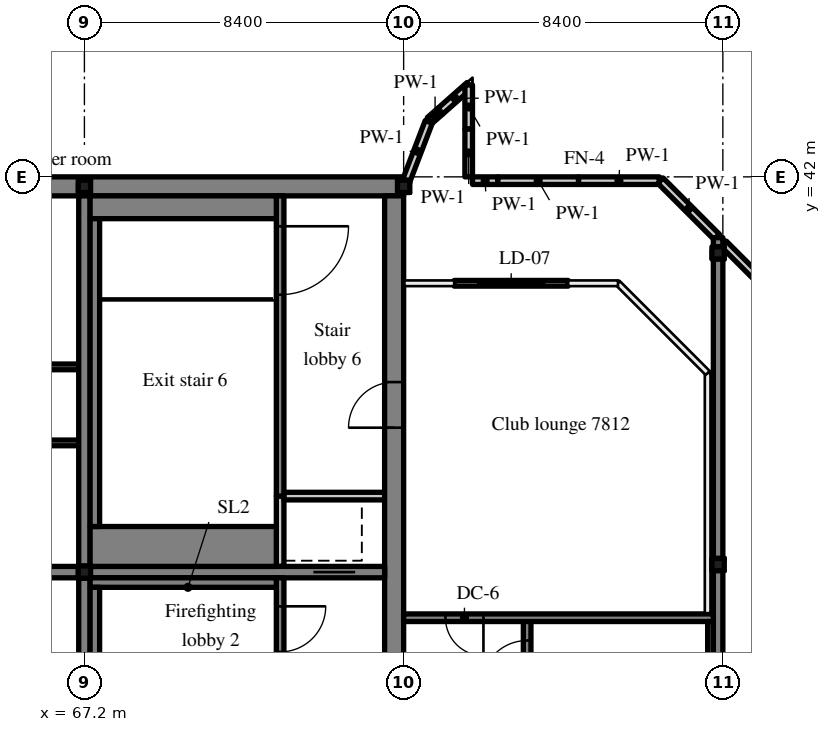
"""IFC4 building model, lengths in metres.
Left out: names, types, materials, properties, quantities, classifications, styles, units other than length and angle.
Written with IfcOpenShell. Run it as: python <this file> out.ifc"""

import sys

from ifc_helpers import new_model, si_unit, direction, frame, frame_2d, origin, origin_2d, place, context, subcontext, project, spatial, rectangle, hollow_circle, extrude, source, transform, mapped, element, fill, save


model = new_model("IFC4")
c1 = context("Model", 3, precision=1e-05, world=origin(), true_north=direction((0.0, 1.0)))
c2 = subcontext(c1, "Body", "Model", "MODEL_VIEW")
j1 = project(units=[si_unit("LENGTHUNIT", "METRE"), si_unit("PLANEANGLEUNIT", "RADIAN")], contexts=[c1])
p1 = place(None, origin())
s1 = spatial("IfcSite", under=j1, at=p1, CompositionType="ELEMENT")
p2 = place(p1, origin())
s2 = spatial("IfcBuilding", under=s1, at=p2, CompositionType="ELEMENT")
p3 = place(p2, frame((0.0, 0.0, 329.7)))
s3 = spatial("IfcBuildingStorey", under=s2, at=p3, CompositionType="ELEMENT", Elevation=329.7)
m1 = source(origin(), c2, "Body", "SweptSolid", [
    extrude(rectangle(XDim=50.4, YDim=0.5, at=frame_2d((25.2, 0.0))), origin(), (0.0, 0.0, 1.0), 4.72),
])
p4 = place(p3, frame((25.2, 41.75, 0.0), z_axis=(0.0, 0.0, 1.0), x_axis=(1.0, 0.0, 0.0)))
e1 = element("IfcWall", 1, at=p4, inside=s3, PredefinedType="SHEAR", context=c2, shape_type="MappedRepresentation", body=[
    mapped(m1, transform((0.0, 0.0, 0.0), scale=1.0)),
])
m2 = source(origin(), c2, "Body", "SweptSolid", [
    extrude(rectangle(XDim=19.0, YDim=0.5, at=frame_2d((9.5, 0.0))), origin(), (0.0, 0.0, 1.0), 4.72),
])
p5 = place(p3, frame((75.35, 22.5, 0.0), z_axis=(0.0, 0.0, 1.0), x_axis=(0.0, 1.0, 0.0)))
e2 = element("IfcWall", 2, at=p5, inside=s3, PredefinedType="SHEAR", context=c2, shape_type="MappedRepresentation", body=[
    mapped(m2, transform((0.0, 0.0, 0.0), scale=1.0)),
])
m3 = source(origin(), c2, "Body", "SweptSolid", [
    extrude(rectangle(XDim=1.2, YDim=2.1, at=frame_2d((0.6, 1.05))), frame((0.0, 0.26, 0.0), z_axis=(0.0, -1.0, 0.0), x_axis=(1.0, 0.0, 0.0)), (0.0, 0.0, 1.0), 0.52),
])
p6 = place(p5, frame((12.9, 0.0, 0.0)))
e3 = element("IfcOpeningElement", 3, at=p6, cuts=e2, PredefinedType="OPENING", context=c2, shape_type="MappedRepresentation", body=[
    mapped(m3, transform((0.0, 0.0, 0.0), scale=1.0)),
])
m4 = source(origin(), c2, "Body", "SweptSolid", [
    extrude(rectangle(XDim=19.0, YDim=0.3, at=frame_2d((9.5, 0.0))), origin(), (0.0, 0.0, 1.0), 4.72),
])
p7 = place(p3, frame((67.2, 22.5, 0.0), z_axis=(0.0, 0.0, 1.0), x_axis=(0.0, 1.0, 0.0)))
e4 = element("IfcWall", 4, at=p7, inside=s3, PredefinedType="SHEAR", context=c2, shape_type="MappedRepresentation", body=[
    mapped(m4, transform((0.0, 0.0, 0.0), scale=1.0)),
])
m5 = source(origin(), c2, "Body", "SweptSolid", [
    extrude(rectangle(XDim=16.5, YDim=0.3, at=frame_2d((8.25, 0.0))), origin(), (0.0, 0.0, 1.0), 4.72),
])
p8 = place(p3, frame((50.55, 31.6, 0.0), z_axis=(0.0, 0.0, 1.0), x_axis=(1.0, 0.0, 0.0)))
e5 = element("IfcWall", 5, at=p8, inside=s3, PredefinedType="SHEAR", context=c2, shape_type="MappedRepresentation", body=[
    mapped(m5, transform((0.0, 0.0, 0.0), scale=1.0)),
])
m6 = source(origin(), c2, "Body", "SweptSolid", [
    extrude(rectangle(XDim=1.0, YDim=2.1, at=frame_2d((0.5, 1.05))), frame((0.0, 0.16, 0.0), z_axis=(0.0, -1.0, 0.0), x_axis=(1.0, 0.0, 0.0)), (0.0, 0.0, 1.0), 0.32),
])
p9 = place(p8, frame((0.625, 0.0, 0.0)))
e6 = element("IfcOpeningElement", 6, at=p9, cuts=e5, PredefinedType="OPENING", context=c2, shape_type="MappedRepresentation", body=[
    mapped(m6, transform((0.0, 0.0, 0.0), scale=1.0)),
])
m7 = source(origin(), c2, "Body", "SweptSolid", [
    extrude(rectangle(XDim=7.75, YDim=0.3, at=frame_2d((3.875, 0.0))), origin(), (0.0, 0.0, 1.0), 4.72),
])
p10 = place(p3, frame((67.35, 31.6, 0.0), z_axis=(0.0, 0.0, 1.0), x_axis=(1.0, 0.0, 0.0)))
e7 = element("IfcWall", 7, at=p10, inside=s3, PredefinedType="SHEAR", context=c2, shape_type="MappedRepresentation", body=[
    mapped(m7, transform((0.0, 0.0, 0.0), scale=1.0)),
])
m8 = source(origin(), c2, "Body", "SweptSolid", [
    extrude(rectangle(XDim=1.1, YDim=2.1, at=frame_2d((0.55, 1.05))), frame((0.0, 0.16, 0.0), z_axis=(0.0, -1.0, 0.0), x_axis=(1.0, 0.0, 0.0)), (0.0, 0.0, 1.0), 0.32),
])
p11 = place(p10, frame((5.875, 0.0, 0.0)))
e8 = element("IfcOpeningElement", 8, at=p11, cuts=e7, PredefinedType="OPENING", context=c2, shape_type="MappedRepresentation", body=[
    mapped(m8, transform((0.0, 0.0, 0.0), scale=1.0)),
])
m9 = source(origin(), c2, "Body", "SweptSolid", [
    extrude(rectangle(XDim=18.4, YDim=0.25, at=frame_2d((9.2, 0.0))), origin(), (0.0, 0.0, 1.0), 4.72),
])
p12 = place(p3, frame((83.875, 22.0, 0.0), z_axis=(0.0, 0.0, 1.0), x_axis=(0.0, 1.0, 0.0)))
e9 = element("IfcWall", 9, at=p12, inside=s3, PredefinedType="SHEAR", context=c2, shape_type="MappedRepresentation", body=[
    mapped(m9, transform((0.0, 0.0, 0.0), scale=1.0)),
])
m10 = source(origin(), c2, "Body", "SweptSolid", [
    extrude(hollow_circle(Radius=0.162, WallThickness=0.012, at=origin_2d()), origin(), (0.0, 0.0, 1.0), 4.4),
])
for number, where, z_axis, x_axis in (
    (10, (67.2, 41.75, 5.0), (0.0, 0.0, 1.0), (1.0, 0.0, 0.0)),
    (11, (75.6, 41.75, 5.0), (0.0, 0.0, 1.0), (1.0, 0.0, 0.0)),
    (12, (83.875, 31.8, 5.0), (0.0, 0.0, 1.0), (1.0, 0.0, 0.0)),
    (13, (83.875, 40.0, 5.0), (0.0, 0.0, 1.0), (1.0, 0.0, 0.0)),
    (14, (67.2, 31.6, 5.0), (0.0, 0.0, 1.0), (1.0, 0.0, 0.0)),
):
    element("IfcColumn", number, at=place(p3, frame(where, z_axis=z_axis, x_axis=x_axis)), inside=s3, PredefinedType="COLUMN", context=c2, shape_type="MappedRepresentation", body=[
        mapped(m10, transform((0.0, 0.0, 0.0), scale=1.0)),
    ])
m11 = source(origin(), c2, "Body", "SweptSolid", [
    extrude(rectangle(XDim=1.655, YDim=0.2, at=frame_2d((0.828, 0.0))), origin(), (0.0, 0.0, 1.0), 1.1),
])
p13 = place(p3, frame((75.669, 41.9, 0.0), z_axis=(0.0, 0.0, 1.0), x_axis=(0.357743070171, 0.933820055334, 0.0)))
e15 = element("IfcWall", 15, at=p13, inside=s3, PredefinedType="PARAPET", context=c2, shape_type="MappedRepresentation", body=[
    mapped(m11, transform((0.0, 0.0, 0.0), scale=1.0)),
])
m12 = source(origin(), c2, "Body", "SweptSolid", [
    extrude(rectangle(XDim=0.372, YDim=0.2, at=frame_2d((0.186, 0.0))), origin(), (0.0, 0.0, 1.0), 1.1),
])
p14 = place(p3, frame((76.288, 43.485, 0.0), z_axis=(0.0, 0.0, 1.0), x_axis=(0.749761145018, 0.661708565323, 0.0)))
e16 = element("IfcWall", 16, at=p14, inside=s3, PredefinedType="PARAPET", context=c2, shape_type="MappedRepresentation", body=[
    mapped(m12, transform((0.0, 0.0, 0.0), scale=1.0)),
])
m13 = source(origin(), c2, "Body", "SweptSolid", [
    extrude(rectangle(XDim=1.024, YDim=0.2, at=frame_2d((0.512, 0.0))), origin(), (0.0, 0.0, 1.0), 1.1),
])
p15 = place(p3, frame((76.567, 43.73, 0.0), z_axis=(0.0, 0.0, 1.0), x_axis=(0.749719578651, 0.661755659884, 0.0)))
e17 = element("IfcWall", 17, at=p15, inside=s3, PredefinedType="PARAPET", context=c2, shape_type="MappedRepresentation", body=[
    mapped(m13, transform((0.0, 0.0, 0.0), scale=1.0)),
])
m14 = source(origin(), c2, "Body", "SweptSolid", [
    extrude(rectangle(XDim=1.16, YDim=0.2, at=frame_2d((0.58, 0.0))), origin(), (0.0, 0.0, 1.0), 1.1),
])
p16 = place(p3, frame((77.312, 44.418, 0.0), z_axis=(0.0, 0.0, 1.0), x_axis=(0.0, -1.0, 0.0)))
e18 = element("IfcWall", 18, at=p16, inside=s3, PredefinedType="PARAPET", context=c2, shape_type="MappedRepresentation", body=[
    mapped(m14, transform((0.0, 0.0, 0.0), scale=1.0)),
])
m15 = source(origin(), c2, "Body", "SweptSolid", [
    extrude(rectangle(XDim=1.258, YDim=0.2, at=frame_2d((0.629, 0.0))), origin(), (0.0, 0.0, 1.0), 1.1),
])
p17 = place(p3, frame((77.312, 43.258, 0.0), z_axis=(0.0, 0.0, 1.0), x_axis=(0.0, -1.0, 0.0)))
e19 = element("IfcWall", 19, at=p17, inside=s3, PredefinedType="PARAPET", context=c2, shape_type="MappedRepresentation", body=[
    mapped(m15, transform((0.0, 0.0, 0.0), scale=1.0)),
])
m16 = source(origin(), c2, "Body", "SweptSolid", [
    extrude(rectangle(XDim=0.666, YDim=0.2, at=frame_2d((0.333, 0.0))), origin(), (0.0, 0.0, 1.0), 1.1),
])
p18 = place(p3, frame((77.412, 41.9, 0.0), z_axis=(0.0, 0.0, 1.0), x_axis=(1.0, 0.0, 0.0)))
e20 = element("IfcWall", 20, at=p18, inside=s3, PredefinedType="PARAPET", context=c2, shape_type="MappedRepresentation", body=[
    mapped(m16, transform((0.0, 0.0, 0.0), scale=1.0)),
])
m17 = source(origin(), c2, "Body", "SweptSolid", [
    extrude(rectangle(XDim=2.125, YDim=0.2, at=frame_2d((1.062, 0.0))), origin(), (0.0, 0.0, 1.0), 1.1),
])
p19 = place(p3, frame((78.078, 41.9, 0.0), z_axis=(0.0, 0.0, 1.0), x_axis=(1.0, 0.0, 0.0)))
e21 = element("IfcWall", 21, at=p19, inside=s3, PredefinedType="PARAPET", context=c2, shape_type="MappedRepresentation", body=[
    mapped(m17, transform((0.0, 0.0, 0.0), scale=1.0)),
])
m18 = source(origin(), c2, "Body", "SweptSolid", [
    extrude(rectangle(XDim=2.124, YDim=0.2, at=frame_2d((1.062, 0.0))), origin(), (0.0, 0.0, 1.0), 1.1),
])
p20 = place(p3, frame((80.203, 41.9, 0.0), z_axis=(0.0, 0.0, 1.0), x_axis=(1.0, 0.0, 0.0)))
e22 = element("IfcWall", 22, at=p20, inside=s3, PredefinedType="PARAPET", context=c2, shape_type="MappedRepresentation", body=[
    mapped(m18, transform((0.0, 0.0, 0.0), scale=1.0)),
])
m19 = source(origin(), c2, "Body", "SweptSolid", [
    extrude(rectangle(XDim=2.093, YDim=0.2, at=frame_2d((1.046, 0.0))), origin(), (0.0, 0.0, 1.0), 1.1),
])
p21 = place(p3, frame((82.359, 41.9, 0.0), z_axis=(0.0, 0.0, 1.0), x_axis=(0.707106781187, -0.707106781187, 0.0)))
e23 = element("IfcWall", 23, at=p21, inside=s3, PredefinedType="PARAPET", context=c2, shape_type="MappedRepresentation", body=[
    mapped(m19, transform((0.0, 0.0, 0.0), scale=1.0)),
])
m20 = source(origin(), c2, "Body", "SweptSolid", [
    extrude(rectangle(XDim=2.324, YDim=0.2, at=frame_2d((1.162, 0.0))), origin(), (0.0, 0.0, 1.0), 1.1),
])
p22 = place(p3, frame((84.02, 40.239, 0.0), z_axis=(0.0, 0.0, 1.0), x_axis=(0.707106781187, -0.707106781187, 0.0)))
e24 = element("IfcWall", 24, at=p22, inside=s3, PredefinedType="PARAPET", context=c2, shape_type="MappedRepresentation", body=[
    mapped(m20, transform((0.0, 0.0, 0.0), scale=1.0)),
])
m21 = source(origin(), c2, "Body", "SweptSolid", [
    extrude(rectangle(XDim=3.0, YDim=0.15, at=frame_2d((1.5, 0.0))), origin(), (0.0, 0.0, 1.0), 4.72),
])
p23 = place(p3, frame((79.93, 39.2, 0.0), z_axis=(0.0, 0.0, 1.0), x_axis=(-1.0, 0.0, 0.0)))
e25 = element("IfcWall", 25, at=p23, inside=s3, PredefinedType="SOLIDWALL", context=c2, shape_type="MappedRepresentation", body=[
    mapped(m21, transform((0.0, 0.0, 0.0), scale=1.0)),
])
m22 = source(origin(), c2, "Body", "SweptSolid", [
    extrude(rectangle(XDim=1.8, YDim=2.4, at=frame_2d((0.9, 1.2))), frame((0.0, 0.085, 0.0), z_axis=(0.0, -1.0, 0.0), x_axis=(1.0, 0.0, 0.0)), (0.0, 0.0, 1.0), 0.17),
])
p24 = place(p23, frame((0.6, 0.0, 0.0)))
e26 = element("IfcOpeningElement", 26, at=p24, cuts=e25, PredefinedType="OPENING", context=c2, shape_type="MappedRepresentation", body=[
    mapped(m22, transform((0.0, 0.0, 0.0), scale=1.0)),
])
m23 = source(origin(), c2, "Body", "SweptSolid", [
    extrude(rectangle(XDim=14.25, YDim=0.15, at=frame_2d((7.125, 0.0))), origin(), (0.0, 0.0, 1.0), 4.72),
])
p25 = place(p3, frame((67.05, 35.0, 0.0), z_axis=(0.0, 0.0, 1.0), x_axis=(-1.0, 0.0, 0.0)))
e27 = element("IfcWall", 27, at=p25, inside=s3, PredefinedType="PARTITIONING", context=c2, shape_type="MappedRepresentation", body=[
    mapped(m23, transform((0.0, 0.0, 0.0), scale=1.0)),
])
m24 = source(origin(), c2, "Body", "SweptSolid", [
    extrude(rectangle(XDim=0.9, YDim=2.1, at=frame_2d((0.45, 1.05))), frame((0.0, 0.085, 0.0), z_axis=(0.0, -1.0, 0.0), x_axis=(1.0, 0.0, 0.0)), (0.0, 0.0, 1.0), 0.17),
])
p26 = place(p25, frame((3.448, 0.0, 0.0)))
e28 = element("IfcOpeningElement", 28, at=p26, cuts=e27, PredefinedType="OPENING", context=c2, shape_type="MappedRepresentation", body=[
    mapped(m24, transform((0.0, 0.0, 0.0), scale=1.0)),
])
p27 = place(p25, frame((10.536, 0.0, 0.0)))
e29 = element("IfcOpeningElement", 29, at=p27, cuts=e27, PredefinedType="OPENING", context=c2, shape_type="MappedRepresentation", body=[
    mapped(m24, transform((0.0, 0.0, 0.0), scale=1.0)),
])
m25 = source(origin(), c2, "Body", "SweptSolid", [
    extrude(rectangle(XDim=16.5, YDim=0.15, at=frame_2d((8.25, 0.0))), origin(), (0.0, 0.0, 1.0), 4.72),
])
p28 = place(p3, frame((67.05, 37.0, 0.0), z_axis=(0.0, 0.0, 1.0), x_axis=(-1.0, 0.0, 0.0)))
e30 = element("IfcWall", 30, at=p28, inside=s3, PredefinedType="PARTITIONING", context=c2, shape_type="MappedRepresentation", body=[
    mapped(m25, transform((0.0, 0.0, 0.0), scale=1.0)),
])
p29 = place(p28, frame((0.788, 0.0, 0.0)))
e31 = element("IfcOpeningElement", 31, at=p29, cuts=e30, PredefinedType="OPENING", context=c2, shape_type="MappedRepresentation", body=[
    mapped(m24, transform((0.0, 0.0, 0.0), scale=1.0)),
])
p30 = place(p28, frame((9.038, 0.0, 0.0)))
e32 = element("IfcOpeningElement", 32, at=p30, cuts=e30, PredefinedType="OPENING", context=c2, shape_type="MappedRepresentation", body=[
    mapped(m24, transform((0.0, 0.0, 0.0), scale=1.0)),
])
m26 = source(origin(), c2, "Body", "SweptSolid", [
    extrude(rectangle(XDim=8.95, YDim=0.2, at=frame_2d((4.475, 0.0))), origin(), (0.0, 0.0, 1.0), 4.72),
])
p31 = place(p3, frame((72.35, 22.5, 0.0), z_axis=(0.0, 0.0, 1.0), x_axis=(0.0, 1.0, 0.0)))
e33 = element("IfcWall", 33, at=p31, inside=s3, PredefinedType="SOLIDWALL", context=c2, shape_type="MappedRepresentation", body=[
    mapped(m26, transform((0.0, 0.0, 0.0), scale=1.0)),
])
m27 = source(origin(), c2, "Body", "SweptSolid", [
    extrude(rectangle(XDim=1.2, YDim=2.1, at=frame_2d((0.6, 1.05))), frame((0.0, 0.11, 0.0), z_axis=(0.0, -1.0, 0.0), x_axis=(1.0, 0.0, 0.0)), (0.0, 0.0, 1.0), 0.22),
])
p32 = place(p31, frame((7.0, 0.0, 0.0)))
e34 = element("IfcOpeningElement", 34, at=p32, cuts=e33, PredefinedType="OPENING", context=c2, shape_type="MappedRepresentation", body=[
    mapped(m27, transform((0.0, 0.0, 0.0), scale=1.0)),
])
m28 = source(origin(), c2, "Body", "SweptSolid", [
    extrude(rectangle(XDim=1.85, YDim=0.2, at=frame_2d((0.925, 0.0))), origin(), (0.0, 0.0, 1.0), 4.72),
])
p33 = place(p3, frame((72.35, 31.75, 0.0), z_axis=(0.0, 0.0, 1.0), x_axis=(0.0, 1.0, 0.0)))
e35 = element("IfcWall", 35, at=p33, inside=s3, PredefinedType="SOLIDWALL", context=c2, shape_type="MappedRepresentation", body=[
    mapped(m28, transform((0.0, 0.0, 0.0), scale=1.0)),
])
m29 = source(origin(), c2, "Body", "SweptSolid", [
    extrude(rectangle(XDim=2.65, YDim=0.2, at=frame_2d((1.325, 0.0))), origin(), (0.0, 0.0, 1.0), 4.72),
])
p34 = place(p3, frame((72.45, 33.6, 0.0), z_axis=(0.0, 0.0, 1.0), x_axis=(1.0, 0.0, 0.0)))
e36 = element("IfcWall", 36, at=p34, inside=s3, PredefinedType="SOLIDWALL", context=c2, shape_type="MappedRepresentation", body=[
    mapped(m29, transform((0.0, 0.0, 0.0), scale=1.0)),
])
m30 = source(origin(), c2, "Body", "SweptSolid", [
    extrude(rectangle(XDim=7.9, YDim=0.2, at=frame_2d((3.95, 0.0))), origin(), (0.0, 0.0, 1.0), 4.72),
])
p35 = place(p3, frame((72.35, 33.6, 0.0), z_axis=(0.0, 0.0, 1.0), x_axis=(0.0, 1.0, 0.0)))
e37 = element("IfcWall", 37, at=p35, inside=s3, PredefinedType="SOLIDWALL", context=c2, shape_type="MappedRepresentation", body=[
    mapped(m30, transform((0.0, 0.0, 0.0), scale=1.0)),
])
m31 = source(origin(), c2, "Body", "SweptSolid", [
    extrude(rectangle(XDim=1.8, YDim=2.1, at=frame_2d((0.9, 1.05))), frame((0.0, 0.11, 0.0), z_axis=(0.0, -1.0, 0.0), x_axis=(1.0, 0.0, 0.0)), (0.0, 0.0, 1.0), 0.22),
])
p36 = place(p35, frame((5.3, 0.0, 0.0)))
e38 = element("IfcOpeningElement", 38, at=p36, cuts=e37, PredefinedType="OPENING", context=c2, shape_type="MappedRepresentation", body=[
    mapped(m31, transform((0.0, 0.0, 0.0), scale=1.0)),
])
m32 = source(origin(), c2, "Body", "SweptSolid", [
    extrude(rectangle(XDim=8.3, YDim=0.2, at=frame_2d((4.15, 0.0))), origin(), (0.0, 0.0, 1.0), 4.72),
])
p37 = place(p3, frame((78.85, 22.1, 0.0), z_axis=(0.0, 0.0, 1.0), x_axis=(0.0, 1.0, 0.0)))
e39 = element("IfcWall", 39, at=p37, inside=s3, PredefinedType="SOLIDWALL", context=c2, shape_type="MappedRepresentation", body=[
    mapped(m32, transform((0.0, 0.0, 0.0), scale=1.0)),
])
p38 = place(p37, frame((6.5, 0.0, 0.0)))
e40 = element("IfcOpeningElement", 40, at=p38, cuts=e39, PredefinedType="OPENING", context=c2, shape_type="MappedRepresentation", body=[
    mapped(m27, transform((0.0, 0.0, 0.0), scale=1.0)),
])
m33 = source(origin(), c2, "Body", "SweptSolid", [
    extrude(rectangle(XDim=8.15, YDim=0.2, at=frame_2d((4.075, 0.0))), origin(), (0.0, 0.0, 1.0), 4.72),
])
p39 = place(p3, frame((83.75, 30.4, 0.0), z_axis=(0.0, 0.0, 1.0), x_axis=(-1.0, 0.0, 0.0)))
e41 = element("IfcWall", 41, at=p39, inside=s3, PredefinedType="SOLIDWALL", context=c2, shape_type="MappedRepresentation", body=[
    mapped(m33, transform((0.0, 0.0, 0.0), scale=1.0)),
])
m34 = source(origin(), c2, "Body", "SweptSolid", [
    extrude(rectangle(XDim=1.0, YDim=2.1, at=frame_2d((0.5, 1.05))), frame((0.0, 0.11, 0.0), z_axis=(0.0, -1.0, 0.0), x_axis=(1.0, 0.0, 0.0)), (0.0, 0.0, 1.0), 0.22),
])
p40 = place(p39, frame((6.05, 0.0, 0.0)))
e42 = element("IfcOpeningElement", 42, at=p40, cuts=e41, PredefinedType="OPENING", context=c2, shape_type="MappedRepresentation", body=[
    mapped(m34, transform((0.0, 0.0, 0.0), scale=1.0)),
])
m35 = source(origin(), c2, "Body", "SweptSolid", [
    extrude(rectangle(XDim=4.9, YDim=0.25, at=frame_2d((2.45, 0.0))), origin(), (0.0, 0.0, 1.0), 4.72),
])
p41 = place(p3, frame((67.35, 31.325, 0.0), z_axis=(0.0, 0.0, 1.0), x_axis=(1.0, 0.0, 0.0)))
e43 = element("IfcWall", 43, at=p41, inside=s3, PredefinedType="SOLIDWALL", context=c2, shape_type="MappedRepresentation", body=[
    mapped(m35, transform((0.0, 0.0, 0.0), scale=1.0)),
])
m36 = source(origin(), c2, "Body", "SweptSolid", [
    extrude(rectangle(XDim=8.1, YDim=0.25, at=frame_2d((4.05, 0.0))), origin(), (0.0, 0.0, 1.0), 4.72),
])
p42 = place(p3, frame((67.475, 23.1, 0.0), z_axis=(0.0, 0.0, 1.0), x_axis=(0.0, 1.0, 0.0)))
e44 = element("IfcWall", 44, at=p42, inside=s3, PredefinedType="SOLIDWALL", context=c2, shape_type="MappedRepresentation", body=[
    mapped(m36, transform((0.0, 0.0, 0.0), scale=1.0)),
])
m37 = source(origin(), c2, "Body", "SweptSolid", [
    extrude(rectangle(XDim=4.9, YDim=0.6, at=frame_2d((2.45, 0.0))), origin(), (0.0, 0.0, 1.0), 4.72),
])
p43 = place(p3, frame((67.35, 41.2, 0.0), z_axis=(0.0, 0.0, 1.0), x_axis=(1.0, 0.0, 0.0)))
e45 = element("IfcWall", 45, at=p43, inside=s3, PredefinedType="SOLIDWALL", context=c2, shape_type="MappedRepresentation", body=[
    mapped(m37, transform((0.0, 0.0, 0.0), scale=1.0)),
])
m38 = source(origin(), c2, "Body", "SweptSolid", [
    extrude(rectangle(XDim=4.9, YDim=1.05, at=frame_2d((2.45, 0.0))), origin(), (0.0, 0.0, 1.0), 4.72),
])
p44 = place(p3, frame((67.35, 32.275, 0.0), z_axis=(0.0, 0.0, 1.0), x_axis=(1.0, 0.0, 0.0)))
e46 = element("IfcWall", 46, at=p44, inside=s3, PredefinedType="SOLIDWALL", context=c2, shape_type="MappedRepresentation", body=[
    mapped(m38, transform((0.0, 0.0, 0.0), scale=1.0)),
])
p45 = place(p3, frame((67.475, 32.8, 0.0), z_axis=(0.0, 0.0, 1.0), x_axis=(0.0, 1.0, 0.0)))
e47 = element("IfcWall", 47, at=p45, inside=s3, PredefinedType="SOLIDWALL", context=c2, shape_type="MappedRepresentation", body=[
    mapped(m36, transform((0.0, 0.0, 0.0), scale=1.0)),
])
m39 = source(origin(), c2, "Body", "SweptSolid", [
    extrude(rectangle(XDim=8.1, YDim=0.15, at=frame_2d((4.05, 0.0))), origin(), (0.0, 0.0, 1.0), 4.72),
])
p46 = place(p3, frame((83.675, 22.2, 0.0), z_axis=(0.0, 0.0, 1.0), x_axis=(0.0, 1.0, 0.0)))
e48 = element("IfcWall", 48, at=p46, inside=s3, PredefinedType="SOLIDWALL", context=c2, shape_type="MappedRepresentation", body=[
    mapped(m39, transform((0.0, 0.0, 0.0), scale=1.0)),
])
m40 = source(origin(), c2, "Body", "SweptSolid", [
    extrude(rectangle(XDim=1.8, YDim=2.4, at=frame_2d((0.9, 1.2))), frame((0.0, 0.025, 0.0), z_axis=(0.0, -1.0, 0.0), x_axis=(1.0, 0.0, 0.0)), (0.0, 0.0, 1.0), 0.05),
])
p47 = place(p24, origin())
e49 = element("IfcDoor", 49, at=p47, inside=s3, OperationType="SLIDING_TO_LEFT", PredefinedType="DOOR", context=c2, shape_type="MappedRepresentation", body=[
    mapped(m40, transform((0.0, 0.0, 0.0), scale=1.0)),
])
fill(e26, e49)
m41 = source(origin(), c2, "Body", "SweptSolid", [
    extrude(rectangle(XDim=1.2, YDim=2.1, at=frame_2d((0.6, 1.05))), frame((0.0, 0.025, 0.0), z_axis=(0.0, -1.0, 0.0), x_axis=(1.0, 0.0, 0.0)), (0.0, 0.0, 1.0), 0.05),
])
p48 = place(p32, origin())
e50 = element("IfcDoor", 50, at=p48, inside=s3, OperationType="SINGLE_SWING_RIGHT", PredefinedType="DOOR", context=c2, shape_type="MappedRepresentation", body=[
    mapped(m41, transform((0.0, 0.0, 0.0), scale=1.0)),
])
fill(e34, e50)
m42 = source(origin(), c2, "Body", "SweptSolid", [
    extrude(rectangle(XDim=1.1, YDim=2.1, at=frame_2d((0.55, 1.05))), frame((0.0, 0.025, 0.0), z_axis=(0.0, -1.0, 0.0), x_axis=(1.0, 0.0, 0.0)), (0.0, 0.0, 1.0), 0.05),
])
p49 = place(p11, origin())
e51 = element("IfcDoor", 51, at=p49, inside=s3, OperationType="SLIDING_TO_LEFT", PredefinedType="DOOR", context=c2, shape_type="MappedRepresentation", body=[
    mapped(m42, transform((0.0, 0.0, 0.0), scale=1.0)),
])
fill(e8, e51)
m43 = source(origin(), c2, "Body", "SweptSolid", [
    extrude(rectangle(XDim=1.8, YDim=2.1, at=frame_2d((0.9, 1.05))), frame((0.0, 0.025, 0.0), z_axis=(0.0, -1.0, 0.0), x_axis=(1.0, 0.0, 0.0)), (0.0, 0.0, 1.0), 0.05),
])
p50 = place(p36, origin())
e52 = element("IfcDoor", 52, at=p50, inside=s3, OperationType="SINGLE_SWING_RIGHT", PredefinedType="DOOR", context=c2, shape_type="MappedRepresentation", body=[
    mapped(m43, transform((0.0, 0.0, 0.0), scale=1.0)),
])
fill(e38, e52)
p51 = place(p6, origin())
e53 = element("IfcDoor", 53, at=p51, inside=s3, OperationType="SINGLE_SWING_LEFT", PredefinedType="DOOR", context=c2, shape_type="MappedRepresentation", body=[
    mapped(m41, transform((0.0, 0.0, 0.0), scale=1.0)),
])
fill(e3, e53)
p52 = place(p38, origin())
e54 = element("IfcDoor", 54, at=p52, inside=s3, OperationType="SINGLE_SWING_LEFT", PredefinedType="DOOR", context=c2, shape_type="MappedRepresentation", body=[
    mapped(m41, transform((0.0, 0.0, 0.0), scale=1.0)),
])
fill(e40, e54)
m44 = source(origin(), c2, "Body", "SweptSolid", [
    extrude(rectangle(XDim=1.0, YDim=2.1, at=frame_2d((0.5, 1.05))), frame((0.0, 0.025, 0.0), z_axis=(0.0, -1.0, 0.0), x_axis=(1.0, 0.0, 0.0)), (0.0, 0.0, 1.0), 0.05),
])
p53 = place(p40, origin())
e55 = element("IfcDoor", 55, at=p53, inside=s3, OperationType="SINGLE_SWING_LEFT", PredefinedType="DOOR", context=c2, shape_type="MappedRepresentation", body=[
    mapped(m44, transform((0.0, 0.0, 0.0), scale=1.0)),
])
fill(e42, e55)
save(model, sys.argv[1])
